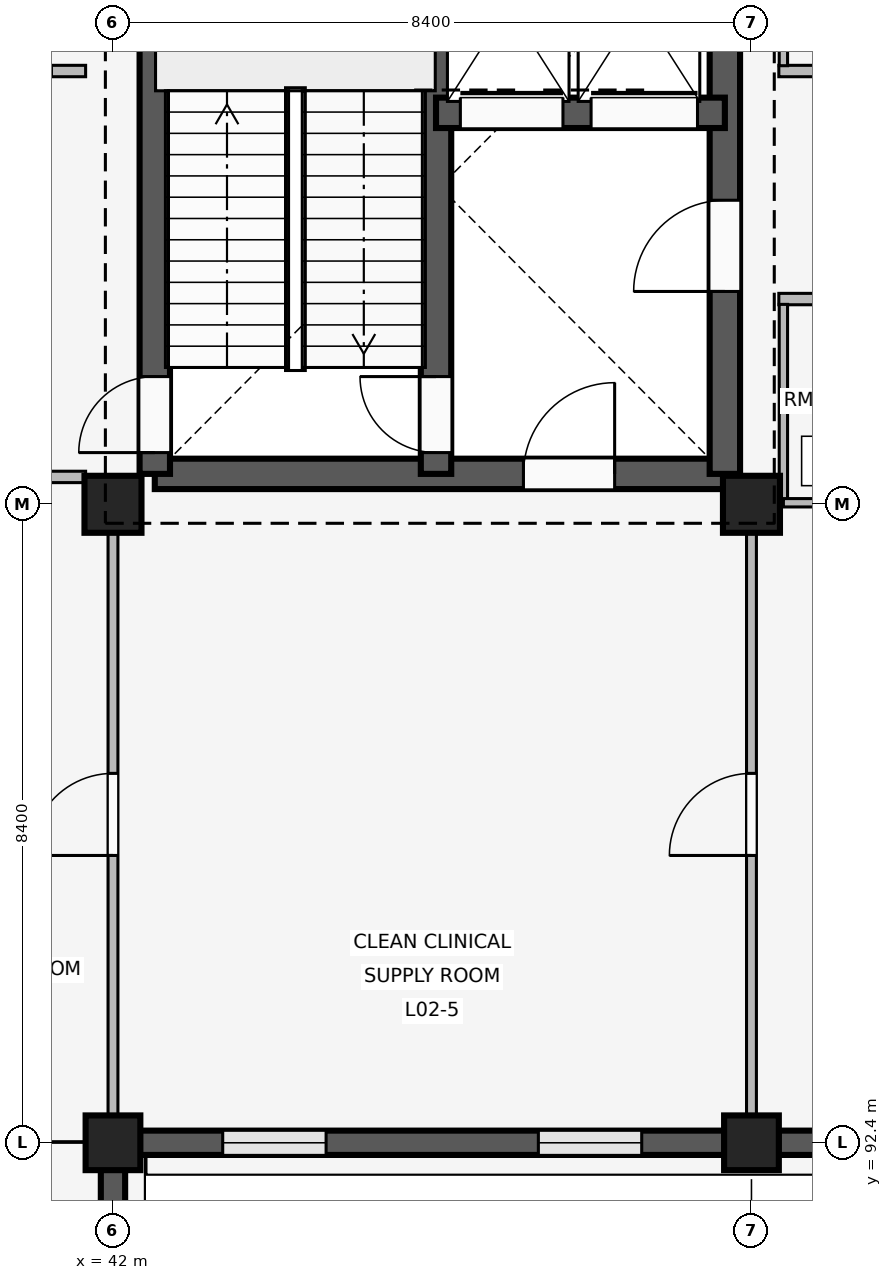
"""IFC4 building model, lengths in metres.
Left out: names, types, materials, properties, quantities, classifications, styles, units other than length and angle.
Written with IfcOpenShell. Run it as: python <this file> out.ifc"""

import sys

from ifc_helpers import new_model, si_unit, direction, frame, frame_2d, origin, origin_2d, place, context, subcontext, project, spatial, rectangle, extrude, element, fill, save


model = new_model("IFC4")
c1 = context("Model", 3, precision=1e-05, world=origin(), true_north=direction((0.0, 1.0)))
c2 = subcontext(c1, "Body", "Model", "MODEL_VIEW")
j1 = project(units=[si_unit("LENGTHUNIT", "METRE"), si_unit("PLANEANGLEUNIT", "RADIAN")], contexts=[c1])
p1 = place(None, origin())
s1 = spatial("IfcSite", under=j1, at=p1, CompositionType="ELEMENT")
p2 = place(p1, origin())
s2 = spatial("IfcBuilding", under=s1, at=p2, CompositionType="ELEMENT")
p3 = place(p2, frame((0.0, 0.0, 8.1)))
s3 = spatial("IfcBuildingStorey", under=s2, at=p3, CompositionType="ELEMENT", Elevation=8.1)
p4 = place(p3, frame((42.0, 92.4, 0.0), z_axis=(0.0, 0.0, 1.0), x_axis=(1.0, 0.0, 0.0)))
e1 = element("IfcColumn", 1, at=p4, inside=s3, PredefinedType="COLUMN", context=c2, shape_type="SweptSolid", body=[
    extrude(rectangle(XDim=0.72, YDim=0.72, at=origin_2d()), origin(), (0.0, 0.0, 1.0), 4.8),
])
p5 = place(p3, frame((42.0, 100.8, 0.0), z_axis=(0.0, 0.0, 1.0), x_axis=(1.0, 0.0, 0.0)))
e2 = element("IfcColumn", 2, at=p5, inside=s3, PredefinedType="COLUMN", context=c2, shape_type="SweptSolid", body=[
    extrude(rectangle(XDim=0.75, YDim=0.75, at=origin_2d()), origin(), (0.0, 0.0, 1.0), 4.8),
])
p6 = place(p3, frame((50.4, 92.4, 0.0), z_axis=(0.0, 0.0, 1.0), x_axis=(1.0, 0.0, 0.0)))
e3 = element("IfcColumn", 3, at=p6, inside=s3, PredefinedType="COLUMN", context=c2, shape_type="SweptSolid", body=[
    extrude(rectangle(XDim=0.72, YDim=0.72, at=origin_2d()), origin(), (0.0, 0.0, 1.0), 4.8),
])
p7 = place(p3, frame((50.4, 100.8, 0.0), z_axis=(0.0, 0.0, 1.0), x_axis=(1.0, 0.0, 0.0)))
e4 = element("IfcColumn", 4, at=p7, inside=s3, PredefinedType="COLUMN", context=c2, shape_type="SweptSolid", body=[
    extrude(rectangle(XDim=0.75, YDim=0.75, at=origin_2d()), origin(), (0.0, 0.0, 1.0), 4.8),
])
p8 = place(p3, frame((42.0, 92.045, 0.0), z_axis=(0.0, 0.0, 1.0), x_axis=(0.0, -1.0, 0.0)))
e5 = element("IfcWall", 5, at=p8, inside=s3, PredefinedType="SOLIDWALL", context=c2, shape_type="SweptSolid", body=[
    extrude(rectangle(XDim=7.69, YDim=0.32, at=frame_2d((3.845, 0.0))), origin(), (0.0, 0.0, 1.0), 3.86),
])
p9 = place(p8, frame((1.069, 0.0, 0.85)))
e6 = element("IfcOpeningElement", 6, at=p9, cuts=e5, PredefinedType="OPENING", context=c2, shape_type="SweptSolid", body=[
    extrude(rectangle(XDim=1.4, YDim=1.4, at=frame_2d((0.7, 0.7))), frame((0.0, 0.17, 0.0), z_axis=(0.0, -1.0, 0.0), x_axis=(1.0, 0.0, 0.0)), (0.0, 0.0, 1.0), 0.34),
])
p10 = place(p8, frame((5.221, 0.0, 0.85)))
e7 = element("IfcOpeningElement", 7, at=p10, cuts=e5, PredefinedType="OPENING", context=c2, shape_type="SweptSolid", body=[
    extrude(rectangle(XDim=1.4, YDim=1.4, at=frame_2d((0.7, 0.7))), frame((0.0, 0.17, 0.0), z_axis=(0.0, -1.0, 0.0), x_axis=(1.0, 0.0, 0.0)), (0.0, 0.0, 1.0), 0.34),
])
p11 = place(p3, frame((50.045, 92.4, 0.0), z_axis=(0.0, 0.0, 1.0), x_axis=(-1.0, 0.0, 0.0)))
e8 = element("IfcWall", 8, at=p11, inside=s3, PredefinedType="SOLIDWALL", context=c2, shape_type="SweptSolid", body=[
    extrude(rectangle(XDim=7.69, YDim=0.32, at=frame_2d((3.845, 0.0))), origin(), (0.0, 0.0, 1.0), 3.86),
])
p12 = place(p11, frame((1.089, 0.0, 0.85)))
e9 = element("IfcOpeningElement", 9, at=p12, cuts=e8, PredefinedType="OPENING", context=c2, shape_type="SweptSolid", body=[
    extrude(rectangle(XDim=1.36, YDim=1.42, at=frame_2d((0.68, 0.71))), frame((0.0, 0.17, 0.0), z_axis=(0.0, -1.0, 0.0), x_axis=(1.0, 0.0, 0.0)), (0.0, 0.0, 1.0), 0.34),
])
p13 = place(p11, frame((5.241, 0.0, 0.85)))
e10 = element("IfcOpeningElement", 10, at=p13, cuts=e8, PredefinedType="OPENING", context=c2, shape_type="SweptSolid", body=[
    extrude(rectangle(XDim=1.36, YDim=1.42, at=frame_2d((0.68, 0.71))), frame((0.0, 0.17, 0.0), z_axis=(0.0, -1.0, 0.0), x_axis=(1.0, 0.0, 0.0)), (0.0, 0.0, 1.0), 0.34),
])
p14 = place(p3, frame((58.445, 92.4, 0.0), z_axis=(0.0, 0.0, 1.0), x_axis=(-1.0, 0.0, 0.0)))
e11 = element("IfcWall", 11, at=p14, inside=s3, PredefinedType="SOLIDWALL", context=c2, shape_type="SweptSolid", body=[
    extrude(rectangle(XDim=7.69, YDim=0.32, at=frame_2d((3.845, 0.0))), origin(), (0.0, 0.0, 1.0), 3.86),
])
p15 = place(p14, frame((1.129, 0.0, 0.85)))
e12 = element("IfcOpeningElement", 12, at=p15, cuts=e11, PredefinedType="OPENING", context=c2, shape_type="SweptSolid", body=[
    extrude(rectangle(XDim=1.28, YDim=1.38, at=frame_2d((0.64, 0.69))), frame((0.0, 0.17, 0.0), z_axis=(0.0, -1.0, 0.0), x_axis=(1.0, 0.0, 0.0)), (0.0, 0.0, 1.0), 0.34),
])
p16 = place(p14, frame((5.281, 0.0, 0.85)))
e13 = element("IfcOpeningElement", 13, at=p16, cuts=e11, PredefinedType="OPENING", context=c2, shape_type="SweptSolid", body=[
    extrude(rectangle(XDim=1.28, YDim=1.38, at=frame_2d((0.64, 0.69))), frame((0.0, 0.17, 0.0), z_axis=(0.0, -1.0, 0.0), x_axis=(1.0, 0.0, 0.0)), (0.0, 0.0, 1.0), 0.34),
])
p17 = place(p3, frame((42.55, 101.2, 0.0), z_axis=(0.0, 0.0, 1.0), x_axis=(1.0, 0.0, 0.0)))
e14 = element("IfcWall", 14, at=p17, inside=s3, PredefinedType="SHEAR", context=c2, shape_type="SweptSolid", body=[
    extrude(rectangle(XDim=7.5, YDim=0.4, at=frame_2d((3.75, 0.0))), origin(), (0.0, 0.0, 1.0), 4.52),
])
p18 = place(p17, frame((4.85, 0.0, 0.0)))
e15 = element("IfcOpeningElement", 15, at=p18, cuts=e14, PredefinedType="OPENING", context=c2, shape_type="SweptSolid", body=[
    extrude(rectangle(XDim=1.2, YDim=2.2, at=frame_2d((0.6, 1.1))), frame((0.0, 0.21, 0.0), z_axis=(0.0, -1.0, 0.0), x_axis=(1.0, 0.0, 0.0)), (0.0, 0.0, 1.0), 0.42),
])
p19 = place(p3, frame((42.55, 101.2, 0.0), z_axis=(0.0, 0.0, 1.0), x_axis=(0.0, 1.0, 0.0)))
e16 = element("IfcWall", 16, at=p19, inside=s3, PredefinedType="SHEAR", context=c2, shape_type="SweptSolid", body=[
    extrude(rectangle(XDim=7.55, YDim=0.4, at=frame_2d((3.775, 0.0))), origin(), (0.0, 0.0, 1.0), 4.52),
])
p20 = place(p19, frame((0.28, 0.0, 0.0)))
e17 = element("IfcOpeningElement", 17, at=p20, cuts=e16, PredefinedType="OPENING", context=c2, shape_type="SweptSolid", body=[
    extrude(rectangle(XDim=1.0, YDim=2.15, at=frame_2d((0.5, 1.075))), frame((0.0, 0.21, 0.0), z_axis=(0.0, -1.0, 0.0), x_axis=(1.0, 0.0, 0.0)), (0.0, 0.0, 1.0), 0.42),
])
p21 = place(p3, frame((50.05, 101.2, 0.0), z_axis=(0.0, 0.0, 1.0), x_axis=(0.0, 1.0, 0.0)))
e18 = element("IfcWall", 18, at=p21, inside=s3, PredefinedType="SHEAR", context=c2, shape_type="SweptSolid", body=[
    extrude(rectangle(XDim=7.55, YDim=0.4, at=frame_2d((3.775, 0.0))), origin(), (0.0, 0.0, 1.0), 4.52),
])
p22 = place(p21, frame((2.4, 0.0, 0.0)))
e19 = element("IfcOpeningElement", 19, at=p22, cuts=e18, PredefinedType="OPENING", context=c2, shape_type="SweptSolid", body=[
    extrude(rectangle(XDim=1.2, YDim=2.2, at=frame_2d((0.6, 1.1))), frame((0.0, 0.21, 0.0), z_axis=(0.0, -1.0, 0.0), x_axis=(1.0, 0.0, 0.0)), (0.0, 0.0, 1.0), 0.42),
])
p23 = place(p3, frame((46.25, 101.2, 0.0), z_axis=(0.0, 0.0, 1.0), x_axis=(0.0, 1.0, 0.0)))
e20 = element("IfcWall", 20, at=p23, inside=s3, PredefinedType="SHEAR", context=c2, shape_type="SweptSolid", body=[
    extrude(rectangle(XDim=7.55, YDim=0.4, at=frame_2d((3.775, 0.0))), origin(), (0.0, 0.0, 1.0), 4.52),
])
p24 = place(p23, frame((0.28, 0.0, 0.0)))
e21 = element("IfcOpeningElement", 21, at=p24, cuts=e20, PredefinedType="OPENING", context=c2, shape_type="SweptSolid", body=[
    extrude(rectangle(XDim=1.0, YDim=2.15, at=frame_2d((0.5, 1.075))), frame((0.0, 0.21, 0.0), z_axis=(0.0, -1.0, 0.0), x_axis=(1.0, 0.0, 0.0)), (0.0, 0.0, 1.0), 0.42),
])
p25 = place(p3, frame((46.25, 105.95, 0.0), z_axis=(0.0, 0.0, 1.0), x_axis=(1.0, 0.0, 0.0)))
e22 = element("IfcWall", 22, at=p25, inside=s3, PredefinedType="SHEAR", context=c2, shape_type="SweptSolid", body=[
    extrude(rectangle(XDim=3.8, YDim=0.4, at=frame_2d((1.9, 0.0))), origin(), (0.0, 0.0, 1.0), 4.52),
])
p26 = place(p25, frame((0.32, 0.0, 0.0)))
e23 = element("IfcOpeningElement", 23, at=p26, cuts=e22, PredefinedType="OPENING", context=c2, shape_type="SweptSolid", body=[
    extrude(rectangle(XDim=1.35, YDim=2.25, at=frame_2d((0.675, 1.125))), frame((0.0, 0.21, 0.0), z_axis=(0.0, -1.0, 0.0), x_axis=(1.0, 0.0, 0.0)), (0.0, 0.0, 1.0), 0.42),
])
p27 = place(p25, frame((2.04, 0.0, 0.0)))
e24 = element("IfcOpeningElement", 24, at=p27, cuts=e22, PredefinedType="OPENING", context=c2, shape_type="SweptSolid", body=[
    extrude(rectangle(XDim=1.4, YDim=2.25, at=frame_2d((0.7, 1.125))), frame((0.0, 0.21, 0.0), z_axis=(0.0, -1.0, 0.0), x_axis=(1.0, 0.0, 0.0)), (0.0, 0.0, 1.0), 0.42),
])
p28 = place(p3, frame((39.46, 101.16, 0.0), z_axis=(0.0, 0.0, 1.0), x_axis=(1.0, 0.0, 0.0)))
e25 = element("IfcWall", 25, at=p28, inside=s3, PredefinedType="PARTITIONING", context=c2, shape_type="SweptSolid", body=[
    extrude(rectangle(XDim=2.18, YDim=0.15, at=frame_2d((1.09, 0.0))), origin(), (0.0, 0.0, 1.0), 3.84),
])
p29 = place(p28, frame((0.5, 0.0, 0.0)))
e26 = element("IfcOpeningElement", 26, at=p29, cuts=e25, PredefinedType="OPENING", context=c2, shape_type="SweptSolid", body=[
    extrude(rectangle(XDim=1.08, YDim=2.15, at=frame_2d((0.54, 1.075))), frame((0.0, 0.085, 0.0), z_axis=(0.0, -1.0, 0.0), x_axis=(1.0, 0.0, 0.0)), (0.0, 0.0, 1.0), 0.17),
])
p30 = place(p3, frame((41.64, 106.5, 0.0), z_axis=(0.0, 0.0, 1.0), x_axis=(-1.0, 0.0, 0.0)))
e27 = element("IfcWall", 27, at=p30, inside=s3, PredefinedType="PARTITIONING", context=c2, shape_type="SweptSolid", body=[
    extrude(rectangle(XDim=7.96, YDim=0.15, at=frame_2d((3.98, 0.0))), origin(), (0.0, 0.0, 1.0), 3.84),
])
p31 = place(p30, frame((0.45, 0.0, 0.0)))
e28 = element("IfcOpeningElement", 28, at=p31, cuts=e27, PredefinedType="OPENING", context=c2, shape_type="SweptSolid", body=[
    extrude(rectangle(XDim=1.3, YDim=2.25, at=frame_2d((0.65, 1.125))), frame((0.0, 0.085, 0.0), z_axis=(0.0, -1.0, 0.0), x_axis=(1.0, 0.0, 0.0)), (0.0, 0.0, 1.0), 0.17),
])
p32 = place(p30, frame((4.15, 0.0, 0.0)))
e29 = element("IfcOpeningElement", 29, at=p32, cuts=e27, PredefinedType="OPENING", context=c2, shape_type="SweptSolid", body=[
    extrude(rectangle(XDim=1.3, YDim=2.25, at=frame_2d((0.65, 1.125))), frame((0.0, 0.085, 0.0), z_axis=(0.0, -1.0, 0.0), x_axis=(1.0, 0.0, 0.0)), (0.0, 0.0, 1.0), 0.17),
])
p33 = place(p3, frame((42.0, 92.54, 0.0), z_axis=(0.0, 0.0, 1.0), x_axis=(0.0, 1.0, 0.0)))
e30 = element("IfcWall", 30, at=p33, inside=s3, PredefinedType="PARTITIONING", context=c2, shape_type="SweptSolid", body=[
    extrude(rectangle(XDim=8.21, YDim=0.13, at=frame_2d((4.105, 0.0))), origin(), (0.0, 0.0, 1.0), 3.84),
])
p34 = place(p33, frame((3.64, 0.0, 0.0)))
e31 = element("IfcOpeningElement", 31, at=p34, cuts=e30, PredefinedType="OPENING", context=c2, shape_type="SweptSolid", body=[
    extrude(rectangle(XDim=1.08, YDim=2.15, at=frame_2d((0.54, 1.075))), frame((0.0, 0.075, 0.0), z_axis=(0.0, -1.0, 0.0), x_axis=(1.0, 0.0, 0.0)), (0.0, 0.0, 1.0), 0.15),
])
p35 = place(p3, frame((50.4, 92.54, 0.0), z_axis=(0.0, 0.0, 1.0), x_axis=(0.0, 1.0, 0.0)))
e32 = element("IfcWall", 32, at=p35, inside=s3, PredefinedType="PARTITIONING", context=c2, shape_type="SweptSolid", body=[
    extrude(rectangle(XDim=8.21, YDim=0.13, at=frame_2d((4.105, 0.0))), origin(), (0.0, 0.0, 1.0), 3.84),
])
p36 = place(p35, frame((3.64, 0.0, 0.0)))
e33 = element("IfcOpeningElement", 33, at=p36, cuts=e32, PredefinedType="OPENING", context=c2, shape_type="SweptSolid", body=[
    extrude(rectangle(XDim=1.08, YDim=2.15, at=frame_2d((0.54, 1.075))), frame((0.0, 0.075, 0.0), z_axis=(0.0, -1.0, 0.0), x_axis=(1.0, 0.0, 0.0)), (0.0, 0.0, 1.0), 0.15),
])
p37 = place(p3, frame((50.76, 103.5, 0.0), z_axis=(0.0, 0.0, 1.0), x_axis=(1.0, 0.0, 0.0)))
e34 = element("IfcWall", 34, at=p37, inside=s3, PredefinedType="PARTITIONING", context=c2, shape_type="SweptSolid", body=[
    extrude(rectangle(XDim=7.96, YDim=0.15, at=frame_2d((3.98, 0.0))), origin(), (0.0, 0.0, 1.0), 3.84),
])
p38 = place(p37, frame((2.25, 0.0, 0.0)))
e35 = element("IfcOpeningElement", 35, at=p38, cuts=e34, PredefinedType="OPENING", context=c2, shape_type="SweptSolid", body=[
    extrude(rectangle(XDim=1.3, YDim=2.25, at=frame_2d((0.65, 1.125))), frame((0.0, 0.085, 0.0), z_axis=(0.0, -1.0, 0.0), x_axis=(1.0, 0.0, 0.0)), (0.0, 0.0, 1.0), 0.17),
])
p39 = place(p37, frame((5.95, 0.0, 0.0)))
e36 = element("IfcOpeningElement", 36, at=p39, cuts=e34, PredefinedType="OPENING", context=c2, shape_type="SweptSolid", body=[
    extrude(rectangle(XDim=1.3, YDim=2.25, at=frame_2d((0.65, 1.125))), frame((0.0, 0.085, 0.0), z_axis=(0.0, -1.0, 0.0), x_axis=(1.0, 0.0, 0.0)), (0.0, 0.0, 1.0), 0.17),
])
p40 = place(p3, frame((50.82, 100.82, 0.0), z_axis=(0.0, 0.0, 1.0), x_axis=(0.0, 1.0, 0.0)))
e37 = element("IfcWall", 37, at=p40, inside=s3, PredefinedType="PARTITIONING", context=c2, shape_type="SweptSolid", body=[
    extrude(rectangle(XDim=2.61, YDim=0.11, at=frame_2d((1.305, 0.0))), origin(), (0.0, 0.0, 1.0), 3.84),
])
p41 = place(p3, frame((50.82, 100.82, 0.0), z_axis=(0.0, 0.0, 1.0), x_axis=(1.0, 0.0, 0.0)))
e38 = element("IfcWall", 38, at=p41, inside=s3, PredefinedType="PARTITIONING", context=c2, shape_type="SweptSolid", body=[
    extrude(rectangle(XDim=1.98, YDim=0.11, at=frame_2d((0.99, 0.0))), origin(), (0.0, 0.0, 1.0), 3.84),
])
p42 = place(p41, frame((0.54, 0.0, 0.0)))
e39 = element("IfcOpeningElement", 39, at=p42, cuts=e38, PredefinedType="OPENING", context=c2, shape_type="SweptSolid", body=[
    extrude(rectangle(XDim=0.9, YDim=2.1, at=frame_2d((0.45, 1.05))), frame((0.0, 0.065, 0.0), z_axis=(0.0, -1.0, 0.0), x_axis=(1.0, 0.0, 0.0)), (0.0, 0.0, 1.0), 0.13),
])
p43 = place(p3, frame((58.72, 106.5, 0.0), z_axis=(0.0, 0.0, 1.0), x_axis=(-1.0, 0.0, 0.0)))
e40 = element("IfcWall", 40, at=p43, inside=s3, PredefinedType="PARTITIONING", context=c2, shape_type="SweptSolid", body=[
    extrude(rectangle(XDim=7.96, YDim=0.15, at=frame_2d((3.98, 0.0))), origin(), (0.0, 0.0, 1.0), 3.84),
])
p44 = place(p43, frame((0.73, 0.0, 0.0)))
e41 = element("IfcOpeningElement", 41, at=p44, cuts=e40, PredefinedType="OPENING", context=c2, shape_type="SweptSolid", body=[
    extrude(rectangle(XDim=1.3, YDim=2.25, at=frame_2d((0.65, 1.125))), frame((0.0, 0.085, 0.0), z_axis=(0.0, -1.0, 0.0), x_axis=(1.0, 0.0, 0.0)), (0.0, 0.0, 1.0), 0.17),
])
p45 = place(p43, frame((4.43, 0.0, 0.0)))
e42 = element("IfcOpeningElement", 42, at=p45, cuts=e40, PredefinedType="OPENING", context=c2, shape_type="SweptSolid", body=[
    extrude(rectangle(XDim=1.3, YDim=2.25, at=frame_2d((0.65, 1.125))), frame((0.0, 0.085, 0.0), z_axis=(0.0, -1.0, 0.0), x_axis=(1.0, 0.0, 0.0)), (0.0, 0.0, 1.0), 0.17),
])
p46 = place(p3, frame((50.82, 106.57, 0.0), z_axis=(0.0, 0.0, 1.0), x_axis=(0.0, 1.0, 0.0)))
e43 = element("IfcWall", 43, at=p46, inside=s3, PredefinedType="PARTITIONING", context=c2, shape_type="SweptSolid", body=[
    extrude(rectangle(XDim=2.61, YDim=0.11, at=frame_2d((1.305, 0.0))), origin(), (0.0, 0.0, 1.0), 3.84),
])
p47 = place(p12, origin())
e44 = element("IfcWindow", 44, at=p47, inside=s3, PartitioningType="SINGLE_PANEL", PredefinedType="WINDOW", context=c2, shape_type="SweptSolid", body=[
    extrude(rectangle(XDim=1.36, YDim=1.42, at=frame_2d((0.68, 0.71))), frame((0.0, 0.03, 0.0), z_axis=(0.0, -1.0, 0.0), x_axis=(1.0, 0.0, 0.0)), (0.0, 0.0, 1.0), 0.06),
])
fill(e9, e44)
p48 = place(p13, origin())
e45 = element("IfcWindow", 45, at=p48, inside=s3, PartitioningType="SINGLE_PANEL", PredefinedType="WINDOW", context=c2, shape_type="SweptSolid", body=[
    extrude(rectangle(XDim=1.36, YDim=1.42, at=frame_2d((0.68, 0.71))), frame((0.0, 0.03, 0.0), z_axis=(0.0, -1.0, 0.0), x_axis=(1.0, 0.0, 0.0)), (0.0, 0.0, 1.0), 0.06),
])
fill(e10, e45)
p49 = place(p22, origin())
e46 = element("IfcDoor", 46, at=p49, inside=s3, OperationType="SINGLE_SWING_LEFT", PredefinedType="DOOR", context=c2, shape_type="SweptSolid", body=[
    extrude(rectangle(XDim=1.2, YDim=2.2, at=frame_2d((0.6, 1.1))), frame((0.0, 0.025, 0.0), z_axis=(0.0, -1.0, 0.0), x_axis=(1.0, 0.0, 0.0)), (0.0, 0.0, 1.0), 0.05),
])
fill(e19, e46)
p50 = place(p18, origin())
e47 = element("IfcDoor", 47, at=p50, inside=s3, OperationType="SINGLE_SWING_RIGHT", PredefinedType="DOOR", context=c2, shape_type="SweptSolid", body=[
    extrude(rectangle(XDim=1.2, YDim=2.2, at=frame_2d((0.6, 1.1))), frame((0.0, 0.025, 0.0), z_axis=(0.0, -1.0, 0.0), x_axis=(1.0, 0.0, 0.0)), (0.0, 0.0, 1.0), 0.05),
])
fill(e15, e47)
p51 = place(p20, origin())
e48 = element("IfcDoor", 48, at=p51, inside=s3, OperationType="SINGLE_SWING_LEFT", PredefinedType="DOOR", context=c2, shape_type="SweptSolid", body=[
    extrude(rectangle(XDim=1.0, YDim=2.15, at=frame_2d((0.5, 1.075))), frame((0.0, 0.025, 0.0), z_axis=(0.0, -1.0, 0.0), x_axis=(1.0, 0.0, 0.0)), (0.0, 0.0, 1.0), 0.05),
])
fill(e17, e48)
p52 = place(p24, origin())
e49 = element("IfcDoor", 49, at=p52, inside=s3, OperationType="SINGLE_SWING_RIGHT", PredefinedType="DOOR", context=c2, shape_type="SweptSolid", body=[
    extrude(rectangle(XDim=1.0, YDim=2.15, at=frame_2d((0.5, 1.075))), frame((0.0, 0.025, 0.0), z_axis=(0.0, -1.0, 0.0), x_axis=(1.0, 0.0, 0.0)), (0.0, 0.0, 1.0), 0.05),
])
fill(e21, e49)
p53 = place(p26, origin())
e50 = element("IfcDoor", 50, at=p53, inside=s3, OperationType="SLIDING_TO_LEFT", PredefinedType="DOOR", context=c2, shape_type="SweptSolid", body=[
    extrude(rectangle(XDim=1.35, YDim=2.25, at=frame_2d((0.675, 1.125))), frame((0.0, 0.025, 0.0), z_axis=(0.0, -1.0, 0.0), x_axis=(1.0, 0.0, 0.0)), (0.0, 0.0, 1.0), 0.05),
])
fill(e23, e50)
p54 = place(p27, origin())
e51 = element("IfcDoor", 51, at=p54, inside=s3, OperationType="SLIDING_TO_LEFT", PredefinedType="DOOR", context=c2, shape_type="SweptSolid", body=[
    extrude(rectangle(XDim=1.4, YDim=2.25, at=frame_2d((0.7, 1.125))), frame((0.0, 0.025, 0.0), z_axis=(0.0, -1.0, 0.0), x_axis=(1.0, 0.0, 0.0)), (0.0, 0.0, 1.0), 0.05),
])
fill(e24, e51)
p55 = place(p34, origin())
e52 = element("IfcDoor", 52, at=p55, inside=s3, OperationType="SINGLE_SWING_LEFT", PredefinedType="DOOR", context=c2, shape_type="SweptSolid", body=[
    extrude(rectangle(XDim=1.08, YDim=2.15, at=frame_2d((0.54, 1.075))), frame((0.0, 0.025, 0.0), z_axis=(0.0, -1.0, 0.0), x_axis=(1.0, 0.0, 0.0)), (0.0, 0.0, 1.0), 0.05),
])
fill(e31, e52)
p56 = place(p36, origin())
e53 = element("IfcDoor", 53, at=p56, inside=s3, OperationType="SINGLE_SWING_LEFT", PredefinedType="DOOR", context=c2, shape_type="SweptSolid", body=[
    extrude(rectangle(XDim=1.08, YDim=2.15, at=frame_2d((0.54, 1.075))), frame((0.0, 0.025, 0.0), z_axis=(0.0, -1.0, 0.0), x_axis=(1.0, 0.0, 0.0)), (0.0, 0.0, 1.0), 0.05),
])
fill(e33, e53)
save(model, sys.argv[1])
